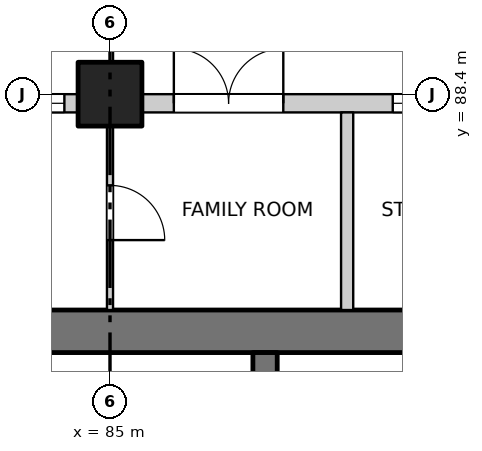
"""IFC4 building model, lengths in metres.
Left out: names, types, materials, properties, quantities, classifications, styles, units other than length and angle.
Written with IfcOpenShell. Run it as: python <this file> out.ifc"""

import sys

from ifc_helpers import new_model, si_unit, direction, frame, frame_2d, origin, origin_2d, place, context, subcontext, project, spatial, rectangle, extrude, element, fill, save


model = new_model("IFC4")
c1 = context("Model", 3, precision=1e-05, world=origin(), true_north=direction((0.0, 1.0)))
c2 = subcontext(c1, "Body", "Model", "MODEL_VIEW")
j1 = project(units=[si_unit("LENGTHUNIT", "METRE"), si_unit("PLANEANGLEUNIT", "RADIAN")], contexts=[c1])
p1 = place(None, origin())
s1 = spatial("IfcSite", under=j1, at=p1, CompositionType="ELEMENT")
p2 = place(p1, origin())
s2 = spatial("IfcBuilding", under=s1, at=p2, CompositionType="ELEMENT")
p3 = place(p2, frame((0.0, 0.0, 36.5)))
s3 = spatial("IfcBuildingStorey", under=s2, at=p3, CompositionType="ELEMENT", Elevation=36.5)
p4 = place(p3, frame((85.0, 88.4, -0.25), z_axis=(0.0, 0.0, 1.0), x_axis=(1.0, 0.0, 0.0)))
e1 = element("IfcColumn", 1, at=p4, inside=s3, PredefinedType="COLUMN", context=c2, shape_type="SweptSolid", body=[
    extrude(rectangle(XDim=1.05, YDim=1.05, at=origin_2d()), origin(), (0.0, 0.0, 1.0), 3.4),
])
p5 = place(p3, frame((75.6, 84.5, -0.25), z_axis=(0.0, 0.0, 1.0), x_axis=(1.0, 0.0, 0.0)))
e2 = element("IfcWall", 2, at=p5, inside=s3, PredefinedType="SOLIDWALL", context=c2, shape_type="SweptSolid", body=[
    extrude(rectangle(XDim=18.8, YDim=0.7, at=frame_2d((9.4, 0.0))), origin(), (0.0, 0.0, 1.0), 3.4),
])
p6 = place(p3, frame((87.55, 82.1, -0.25), z_axis=(0.0, 0.0, 1.0), x_axis=(0.0, 1.0, 0.0)))
e3 = element("IfcWall", 3, at=p6, inside=s3, PredefinedType="SOLIDWALL", context=c2, shape_type="SweptSolid", body=[
    extrude(rectangle(XDim=2.05, YDim=0.4, at=frame_2d((1.025, 0.0))), origin(), (0.0, 0.0, 1.0), 3.4),
])
p7 = place(p6, frame((0.65, 0.0, 0.25)))
e4 = element("IfcOpeningElement", 4, at=p7, cuts=e3, PredefinedType="OPENING", context=c2, shape_type="SweptSolid", body=[
    extrude(rectangle(XDim=0.9, YDim=2.1, at=frame_2d((0.45, 1.05))), frame((0.0, 0.21, 0.0), z_axis=(0.0, -1.0, 0.0), x_axis=(1.0, 0.0, 0.0)), (0.0, 0.0, 1.0), 0.42),
])
p8 = place(p3, frame((77.725, 88.25, 0.0), z_axis=(0.0, 0.0, 1.0), x_axis=(1.0, 0.0, 0.0)))
e5 = element("IfcWall", 5, at=p8, inside=s3, PredefinedType="SOLIDWALL", context=c2, shape_type="SweptSolid", body=[
    extrude(rectangle(XDim=6.75, YDim=0.3, at=frame_2d((3.375, 0.0))), origin(), (0.0, 0.0, 1.0), 2.7),
])
p9 = place(p8, frame((0.225, 0.0, 0.9)))
e6 = element("IfcOpeningElement", 6, at=p9, cuts=e5, PredefinedType="OPENING", context=c2, shape_type="SweptSolid", body=[
    extrude(rectangle(XDim=2.4, YDim=1.8, at=frame_2d((1.2, 0.9))), frame((0.0, 0.16, 0.0), z_axis=(0.0, -1.0, 0.0), x_axis=(1.0, 0.0, 0.0)), (0.0, 0.0, 1.0), 0.32),
])
p10 = place(p8, frame((4.125, 0.0, 0.9)))
e7 = element("IfcOpeningElement", 7, at=p10, cuts=e5, PredefinedType="OPENING", context=c2, shape_type="SweptSolid", body=[
    extrude(rectangle(XDim=2.4, YDim=1.8, at=frame_2d((1.2, 0.9))), frame((0.0, 0.16, 0.0), z_axis=(0.0, -1.0, 0.0), x_axis=(1.0, 0.0, 0.0)), (0.0, 0.0, 1.0), 0.32),
])
p11 = place(p3, frame((85.525, 88.25, 0.0), z_axis=(0.0, 0.0, 1.0), x_axis=(1.0, 0.0, 0.0)))
e8 = element("IfcWall", 8, at=p11, inside=s3, PredefinedType="SOLIDWALL", context=c2, shape_type="SweptSolid", body=[
    extrude(rectangle(XDim=6.75, YDim=0.3, at=frame_2d((3.375, 0.0))), origin(), (0.0, 0.0, 1.0), 2.7),
])
p12 = place(p11, frame((0.525, 0.0, 0.0)))
e9 = element("IfcOpeningElement", 9, at=p12, cuts=e8, PredefinedType="OPENING", context=c2, shape_type="SweptSolid", body=[
    extrude(rectangle(XDim=1.8, YDim=2.4, at=frame_2d((0.9, 1.2))), frame((0.0, 0.16, 0.0), z_axis=(0.0, -1.0, 0.0), x_axis=(1.0, 0.0, 0.0)), (0.0, 0.0, 1.0), 0.32),
])
p13 = place(p11, frame((4.125, 0.0, 0.9)))
e10 = element("IfcOpeningElement", 10, at=p13, cuts=e8, PredefinedType="OPENING", context=c2, shape_type="SweptSolid", body=[
    extrude(rectangle(XDim=2.4, YDim=1.8, at=frame_2d((1.2, 0.9))), frame((0.0, 0.16, 0.0), z_axis=(0.0, -1.0, 0.0), x_axis=(1.0, 0.0, 0.0)), (0.0, 0.0, 1.0), 0.32),
])
p14 = place(p3, frame((85.0, 84.85, 0.0), z_axis=(0.0, 0.0, 1.0), x_axis=(0.0, 1.0, 0.0)))
e11 = element("IfcWall", 11, at=p14, inside=s3, PredefinedType="PARTITIONING", context=c2, shape_type="SweptSolid", body=[
    extrude(rectangle(XDim=3.25, YDim=0.1, at=frame_2d((1.625, 0.0))), origin(), (0.0, 0.0, 1.0), 3.15),
])
p15 = place(p14, frame((1.15, 0.0, 0.0)))
e12 = element("IfcOpeningElement", 12, at=p15, cuts=e11, PredefinedType="OPENING", context=c2, shape_type="SweptSolid", body=[
    extrude(rectangle(XDim=0.9, YDim=2.1, at=frame_2d((0.45, 1.05))), frame((0.0, 0.06, 0.0), z_axis=(0.0, -1.0, 0.0), x_axis=(1.0, 0.0, 0.0)), (0.0, 0.0, 1.0), 0.12),
])
p16 = place(p3, frame((88.9, 84.85, 0.0), z_axis=(0.0, 0.0, 1.0), x_axis=(0.0, 1.0, 0.0)))
e13 = element("IfcWall", 13, at=p16, inside=s3, PredefinedType="PARTITIONING", context=c2, shape_type="SweptSolid", body=[
    extrude(rectangle(XDim=3.25, YDim=0.2, at=frame_2d((1.625, 0.0))), origin(), (0.0, 0.0, 1.0), 3.15),
])
p17 = place(p10, origin())
e14 = element("IfcWindow", 14, at=p17, inside=s3, PartitioningType="DOUBLE_PANEL_VERTICAL", PredefinedType="WINDOW", context=c2, shape_type="SweptSolid", body=[
    extrude(rectangle(XDim=2.4, YDim=1.8, at=frame_2d((1.2, 0.9))), frame((0.0, 0.03, 0.0), z_axis=(0.0, -1.0, 0.0), x_axis=(1.0, 0.0, 0.0)), (0.0, 0.0, 1.0), 0.06),
])
fill(e7, e14)
p18 = place(p12, origin())
e15 = element("IfcDoor", 15, at=p18, inside=s3, OperationType="DOUBLE_DOOR_SINGLE_SWING", PredefinedType="DOOR", context=c2, shape_type="SweptSolid", body=[
    extrude(rectangle(XDim=1.8, YDim=2.4, at=frame_2d((0.9, 1.2))), frame((0.0, 0.025, 0.0), z_axis=(0.0, -1.0, 0.0), x_axis=(1.0, 0.0, 0.0)), (0.0, 0.0, 1.0), 0.05),
])
fill(e9, e15)
p19 = place(p13, origin())
e16 = element("IfcWindow", 16, at=p19, inside=s3, PartitioningType="DOUBLE_PANEL_VERTICAL", PredefinedType="WINDOW", context=c2, shape_type="SweptSolid", body=[
    extrude(rectangle(XDim=2.4, YDim=1.8, at=frame_2d((1.2, 0.9))), frame((0.0, 0.03, 0.0), z_axis=(0.0, -1.0, 0.0), x_axis=(1.0, 0.0, 0.0)), (0.0, 0.0, 1.0), 0.06),
])
fill(e10, e16)
p20 = place(p15, origin())
e17 = element("IfcDoor", 17, at=p20, inside=s3, OperationType="SINGLE_SWING_RIGHT", PredefinedType="DOOR", context=c2, shape_type="SweptSolid", body=[
    extrude(rectangle(XDim=0.9, YDim=2.1, at=frame_2d((0.45, 1.05))), frame((0.0, 0.025, 0.0), z_axis=(0.0, -1.0, 0.0), x_axis=(1.0, 0.0, 0.0)), (0.0, 0.0, 1.0), 0.05),
])
fill(e12, e17)
save(model, sys.argv[1])
